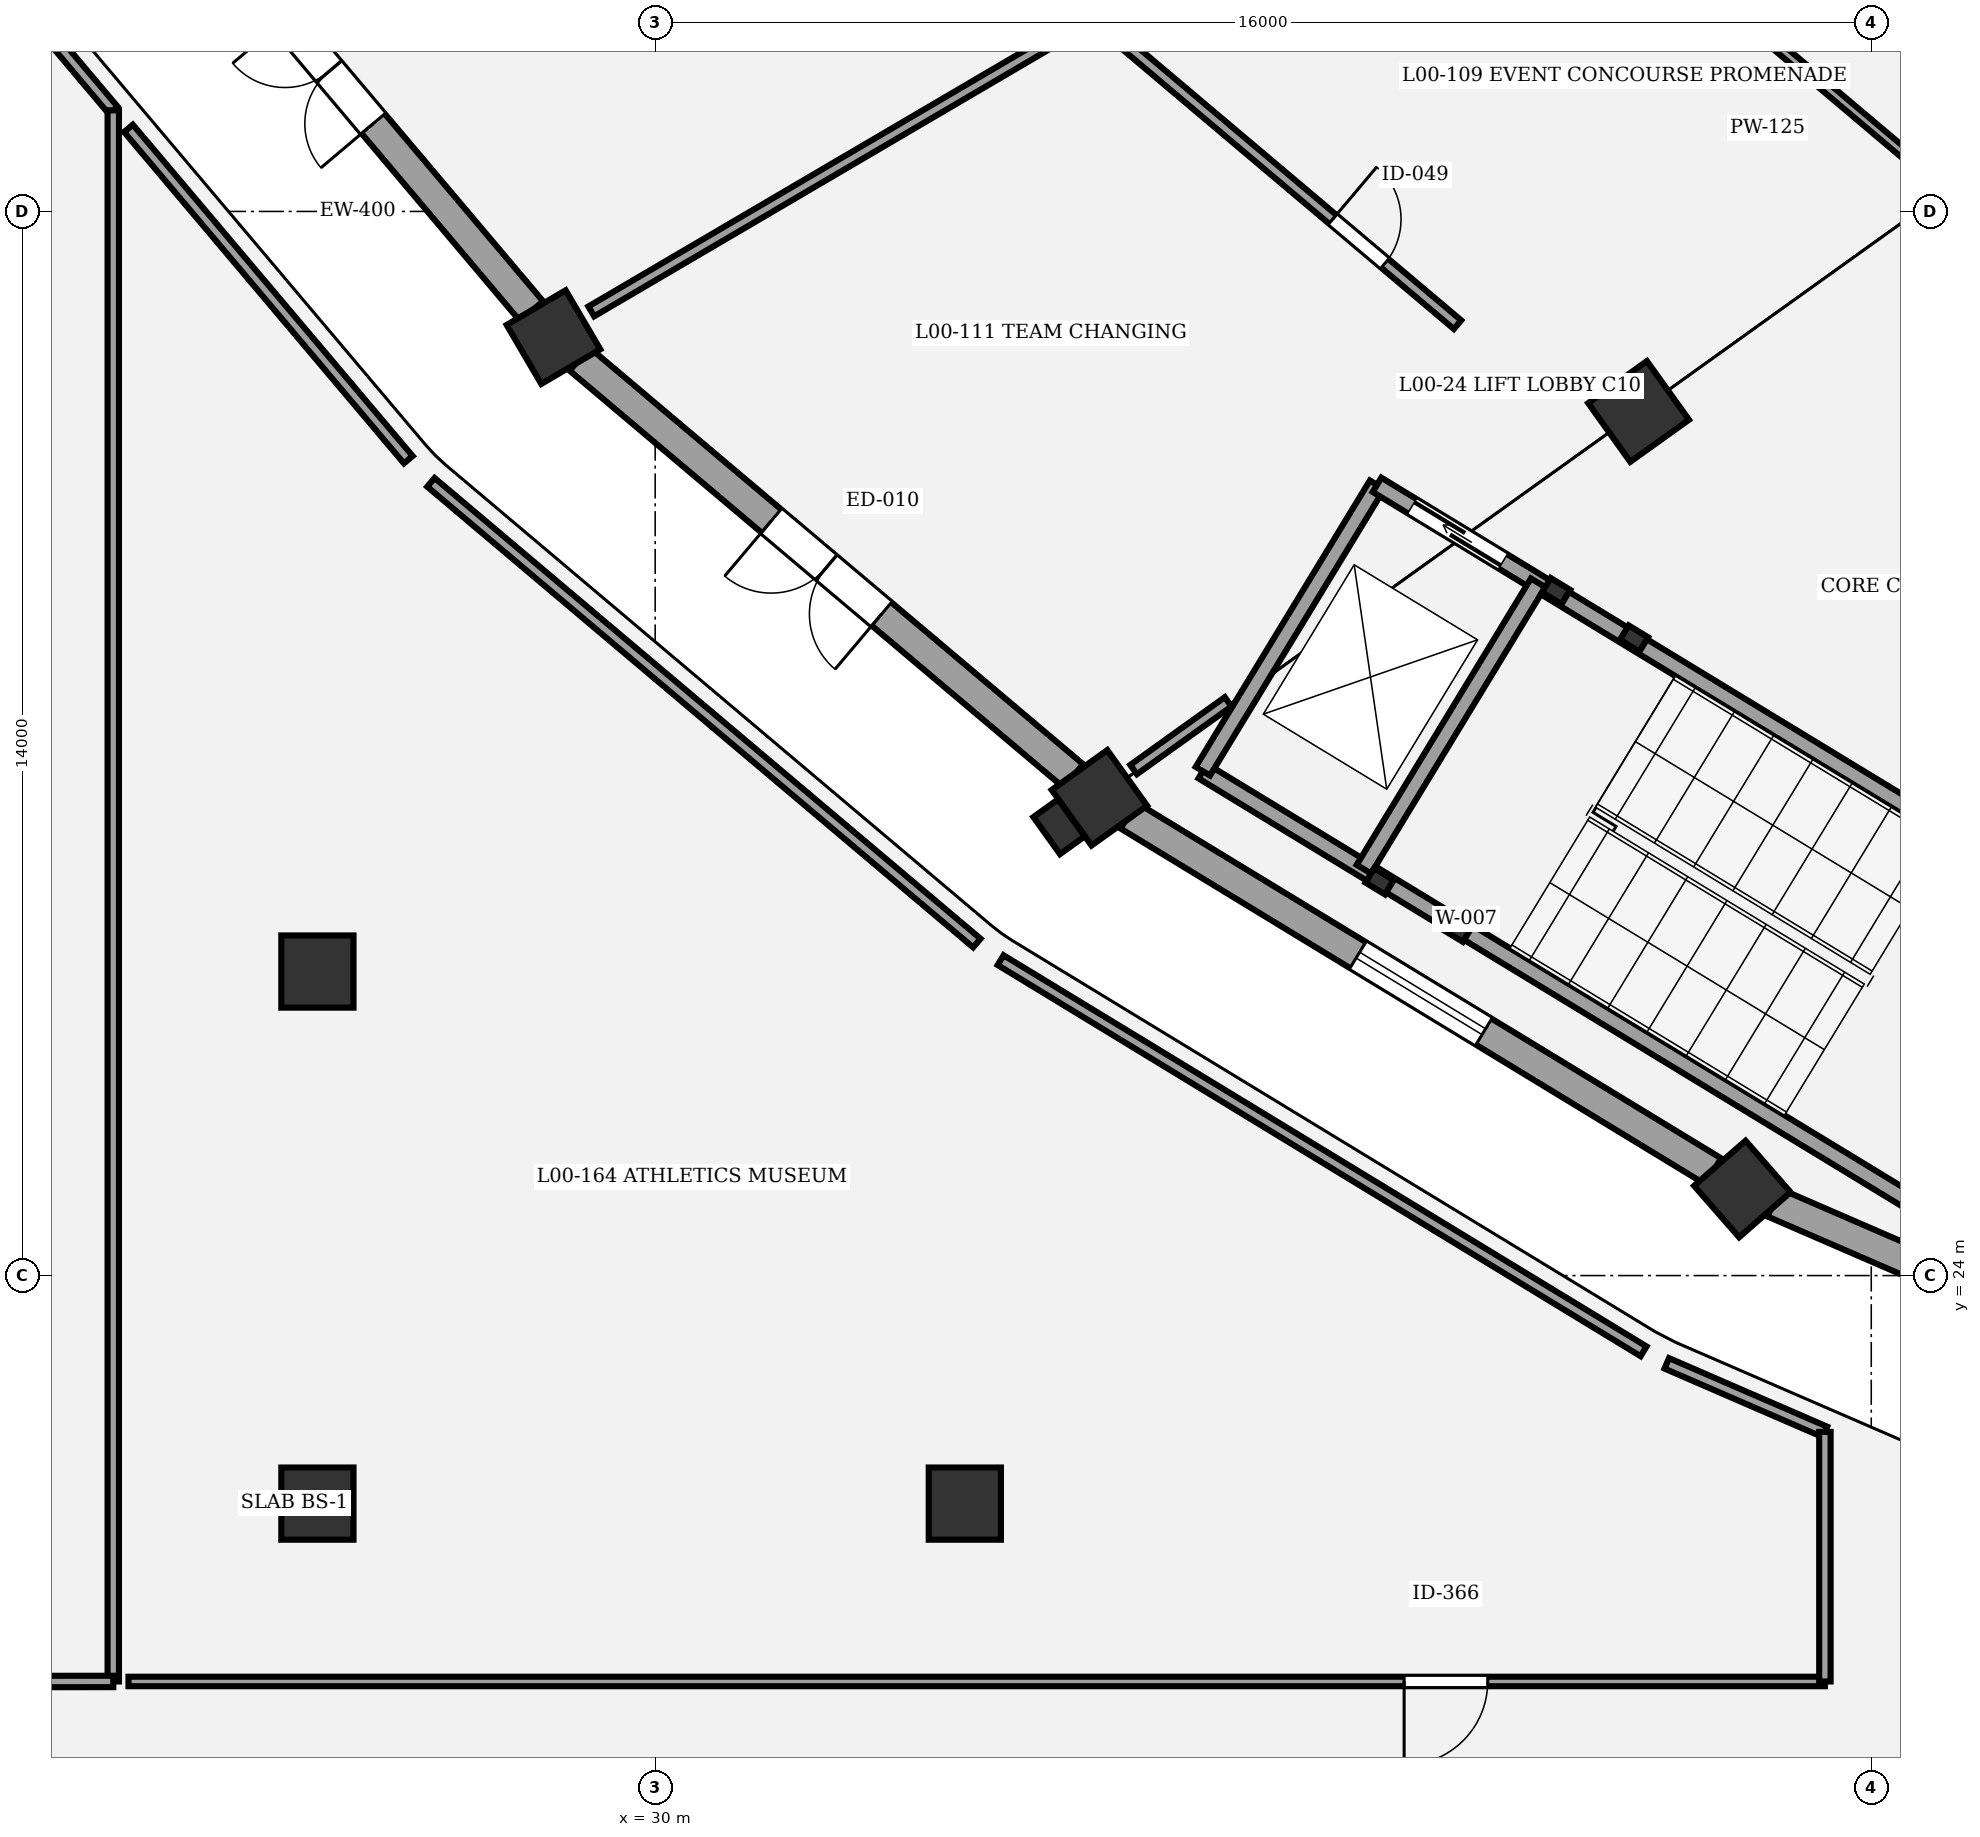
"""IFC4 building model, lengths in metres.
Left out: names, types, materials, properties, quantities, classifications, styles, units other than length and angle.
Written with IfcOpenShell. Run it as: python <this file> out.ifc"""

import sys

from ifc_helpers import new_model, si_unit, direction, frame, frame_2d, origin, origin_2d, place, context, subcontext, project, spatial, rectangle, circle, extrude, element, fill, save


model = new_model("IFC4")
c1 = context("Model", 3, precision=1e-05, world=origin(), true_north=direction((0.0, 1.0)))
c2 = subcontext(c1, "Body", "Model", "MODEL_VIEW")
j1 = project(units=[si_unit("LENGTHUNIT", "METRE"), si_unit("PLANEANGLEUNIT", "RADIAN")], contexts=[c1])
p1 = place(None, origin())
s1 = spatial("IfcSite", under=j1, at=p1, CompositionType="ELEMENT")
p2 = place(p1, origin())
s2 = spatial("IfcBuilding", under=s1, at=p2, CompositionType="ELEMENT")
p3 = place(p2, origin())
s3 = spatial("IfcBuildingStorey", under=s2, at=p3, CompositionType="ELEMENT", Elevation=0.0)
p4 = place(p3, frame((28.662, 36.346, 0.0), z_axis=(0.0, 0.0, 1.0), x_axis=(-0.862513669207, -0.506033764121, 0.0)))
e1 = element("IfcColumn", 1, at=p4, inside=s3, PredefinedType="COLUMN", context=c2, shape_type="SweptSolid", body=[
    extrude(rectangle(XDim=0.9, YDim=0.9, at=origin_2d()), origin(), (0.0, 0.0, 1.0), 5.4),
])
p5 = place(p3, frame((42.939, 35.368, 0.0), z_axis=(0.0, 0.0, 1.0), x_axis=(-0.812897512265, -0.582406760395, 0.0)))
e2 = element("IfcColumn", 2, at=p5, inside=s3, PredefinedType="COLUMN", context=c2, shape_type="SweptSolid", body=[
    extrude(rectangle(XDim=0.95, YDim=0.95, at=origin_2d()), origin(), (0.0, 0.0, 1.0), 5.4),
])
p6 = place(p3, frame((35.844, 30.285, 0.0), z_axis=(0.0, 0.0, 1.0), x_axis=(-0.812897512265, -0.582406760395, 0.0)))
e3 = element("IfcColumn", 3, at=p6, inside=s3, PredefinedType="COLUMN", context=c2, shape_type="SweptSolid", body=[
    extrude(rectangle(XDim=0.9, YDim=0.9, at=origin_2d()), origin(), (0.0, 0.0, 1.0), 5.4),
])
p7 = place(p3, frame((35.314, 29.905, 0.0), z_axis=(0.0, 0.0, 1.0), x_axis=(0.582406760395, -0.812897512265, 0.0)))
e4 = element("IfcColumn", 4, at=p7, inside=s3, PredefinedType="PILASTER", context=c2, shape_type="SweptSolid", body=[
    extrude(rectangle(XDim=0.6, YDim=0.4, at=origin_2d()), origin(), (0.0, 0.0, 1.0), 5.4),
])
p8 = place(p3, frame((44.304, 25.139, 0.0), z_axis=(0.0, 0.0, 1.0), x_axis=(-0.752529860433, -0.658558128912, 0.0)))
e5 = element("IfcColumn", 5, at=p8, inside=s3, PredefinedType="COLUMN", context=c2, shape_type="SweptSolid", body=[
    extrude(rectangle(XDim=0.9, YDim=0.9, at=origin_2d()), origin(), (0.0, 0.0, 1.0), 5.4),
])
for number, where, z_axis, x_axis in (
    (6, (25.556, 21.0, 0.0), (0.0, 0.0, 1.0), (1.0, 0.0, 0.0)),
    (7, (25.556, 28.0, 0.0), (0.0, 0.0, 1.0), (1.0, 0.0, 0.0)),
    (8, (34.074, 21.0, 0.0), (0.0, 0.0, 1.0), (1.0, 0.0, 0.0)),
):
    element("IfcColumn", number, at=place(p3, frame(where, z_axis=z_axis, x_axis=x_axis)), inside=s3, PredefinedType="COLUMN", context=c2, shape_type="SweptSolid", body=[
        extrude(circle(Radius=0.475, at=origin_2d()), origin(), (0.0, 0.0, 1.0), 5.4),
    ])
p9 = place(p3, frame((28.373, 36.689, 0.0), z_axis=(0.0, 0.0, 1.0), x_axis=(-0.645194244502, 0.764018577563, 0.0)))
e9 = element("IfcWall", 9, at=p9, inside=s3, PredefinedType="STANDARD", context=c2, shape_type="SweptSolid", body=[
    extrude(rectangle(XDim=8.256, YDim=0.4, at=frame_2d((4.128, 0.0))), origin(), (0.0, 0.0, 1.0), 4.25),
])
p10 = place(p9, frame((3.228, 0.0, 0.0)))
e10 = element("IfcOpeningElement", 10, at=p10, cuts=e9, PredefinedType="OPENING", context=c2, shape_type="SweptSolid", body=[
    extrude(rectangle(XDim=1.8, YDim=2.4, at=frame_2d((0.9, 1.2))), frame((0.0, 0.21, 0.0), z_axis=(0.0, -1.0, 0.0), x_axis=(1.0, 0.0, 0.0)), (0.0, 0.0, 1.0), 0.42),
])
p11 = place(p3, frame((35.502, 30.574, 0.0), z_axis=(0.0, 0.0, 1.0), x_axis=(-0.764254773348, 0.644914445035, 0.0)))
e11 = element("IfcWall", 11, at=p11, inside=s3, PredefinedType="STANDARD", context=c2, shape_type="SweptSolid", body=[
    extrude(rectangle(XDim=8.502, YDim=0.4, at=frame_2d((4.251, 0.0))), origin(), (0.0, 0.0, 1.0), 4.25),
])
p12 = place(p11, frame((3.301, 0.0, 0.0)))
e12 = element("IfcOpeningElement", 12, at=p12, cuts=e11, PredefinedType="OPENING", context=c2, shape_type="SweptSolid", body=[
    extrude(rectangle(XDim=1.9, YDim=2.4, at=frame_2d((0.95, 1.2))), frame((0.0, 0.21, 0.0), z_axis=(0.0, -1.0, 0.0), x_axis=(1.0, 0.0, 0.0)), (0.0, 0.0, 1.0), 0.42),
])
p13 = place(p3, frame((43.921, 25.372, 0.0), z_axis=(0.0, 0.0, 1.0), x_axis=(-0.854319454423, 0.519748275413, 0.0)))
e13 = element("IfcWall", 13, at=p13, inside=s3, PredefinedType="STANDARD", context=c2, shape_type="SweptSolid", body=[
    extrude(rectangle(XDim=9.006, YDim=0.4, at=frame_2d((4.503, 0.0))), origin(), (0.0, 0.0, 1.0), 4.25),
])
p14 = place(p13, frame((3.533, 0.0, 1.1)))
e14 = element("IfcOpeningElement", 14, at=p14, cuts=e13, PredefinedType="OPENING", context=c2, shape_type="SweptSolid", body=[
    extrude(rectangle(XDim=1.94, YDim=1.55, at=frame_2d((0.97, 0.775))), frame((0.0, 0.21, 0.0), z_axis=(0.0, -1.0, 0.0), x_axis=(1.0, 0.0, 0.0)), (0.0, 0.0, 1.0), 0.42),
])
p15 = place(p3, frame((53.651, 21.087, 0.0), z_axis=(0.0, 0.0, 1.0), x_axis=(-0.917498309763, 0.397739678159, 0.0)))
e15 = element("IfcWall", 15, at=p15, inside=s3, PredefinedType="STANDARD", context=c2, shape_type="SweptSolid", body=[
    extrude(rectangle(XDim=9.74, YDim=0.4, at=frame_2d((4.87, 0.0))), origin(), (0.0, 0.0, 1.0), 4.25),
])
p16 = place(p15, frame((3.87, 0.0, 0.0)))
e16 = element("IfcOpeningElement", 16, at=p16, cuts=e15, PredefinedType="OPENING", context=c2, shape_type="SweptSolid", body=[
    extrude(rectangle(XDim=2.0, YDim=2.4, at=frame_2d((1.0, 1.2))), frame((0.0, 0.21, 0.0), z_axis=(0.0, -1.0, 0.0), x_axis=(1.0, 0.0, 0.0)), (0.0, 0.0, 1.0), 0.42),
])
for number, where, z_axis, x_axis in (
    (17, (42.879, 32.382, 0.0), (0.0, 0.0, 1.0), (-0.854, 0.52, 0.0)),
    (18, (41.854, 33.005, 0.0), (0.0, 0.0, 1.0), (-0.854, 0.52, 0.0)),
    (19, (39.531, 29.186, 0.0), (0.0, 0.0, 1.0), (-0.854, 0.52, 0.0)),
    (20, (40.556, 28.562, 0.0), (0.0, 0.0, 1.0), (-0.854, 0.52, 0.0)),
):
    element("IfcColumn", number, at=place(p3, frame(where, z_axis=z_axis, x_axis=x_axis)), inside=s3, PredefinedType="COLUMN", context=c2, shape_type="SweptSolid", body=[
        extrude(rectangle(XDim=0.3, YDim=0.22, at=origin_2d()), origin(), (0.0, 0.0, 1.0), 5.4),
    ])
p17 = place(p3, frame((46.621, 24.909, 0.0), z_axis=(0.0, 0.0, 1.0), x_axis=(-0.854373055797, 0.519660159651, 0.0)))
e21 = element("IfcWall", 21, at=p17, inside=s3, PredefinedType="SHEAR", context=c2, shape_type="SweptSolid", body=[
    extrude(rectangle(XDim=11.02, YDim=0.22, at=frame_2d((5.51, 0.0))), origin(), (0.0, 0.0, 1.0), 5.15),
])
p18 = place(p3, frame((39.497, 34.403, 0.0), z_axis=(0.0, 0.0, 1.0), x_axis=(-0.519664162523, -0.854370621095, 0.0)))
e22 = element("IfcWall", 22, at=p18, inside=s3, PredefinedType="SHEAR", context=c2, shape_type="SweptSolid", body=[
    extrude(rectangle(XDim=4.41, YDim=0.22, at=frame_2d((2.205, 0.0))), origin(), (0.0, 0.0, 1.0), 5.15),
])
p19 = place(p3, frame((48.913, 28.677, 0.0), z_axis=(0.0, 0.0, 1.0), x_axis=(-0.854369202373, 0.51966649501, 0.0)))
e23 = element("IfcWall", 23, at=p19, inside=s3, PredefinedType="SHEAR", context=c2, shape_type="SweptSolid", body=[
    extrude(rectangle(XDim=11.02, YDim=0.22, at=frame_2d((5.51, 0.0))), origin(), (0.0, 0.0, 1.0), 5.15),
])
p20 = place(p19, frame((0.3, 0.0, 0.0)))
e24 = element("IfcOpeningElement", 24, at=p20, cuts=e23, PredefinedType="OPENING", context=c2, shape_type="SweptSolid", body=[
    extrude(rectangle(XDim=1.15, YDim=2.15, at=frame_2d((0.575, 1.075))), frame((0.0, 0.12, 0.0), z_axis=(0.0, -1.0, 0.0), x_axis=(1.0, 0.0, 0.0)), (0.0, 0.0, 1.0), 0.24),
])
p21 = place(p19, frame((9.08, 0.0, 0.0)))
e25 = element("IfcOpeningElement", 25, at=p21, cuts=e23, PredefinedType="OPENING", context=c2, shape_type="SweptSolid", body=[
    extrude(rectangle(XDim=1.4, YDim=2.25, at=frame_2d((0.7, 1.125))), frame((0.0, 0.12, 0.0), z_axis=(0.0, -1.0, 0.0), x_axis=(1.0, 0.0, 0.0)), (0.0, 0.0, 1.0), 0.24),
])
p22 = place(p3, frame((41.616, 33.115, 0.0), z_axis=(0.0, 0.0, 1.0), x_axis=(-0.519664162523, -0.854370621095, 0.0)))
e26 = element("IfcWall", 26, at=p22, inside=s3, PredefinedType="SHEAR", context=c2, shape_type="SweptSolid", body=[
    extrude(rectangle(XDim=4.41, YDim=0.22, at=frame_2d((2.205, 0.0))), origin(), (0.0, 0.0, 1.0), 5.15),
])
p23 = place(p3, frame((46.973, 38.308, 0.0), z_axis=(0.0, 0.0, 1.0), x_axis=(-0.764249122867, 0.644921141068, 0.0)))
e27 = element("IfcWall", 27, at=p23, inside=s3, PredefinedType="PARTITIONING", context=c2, shape_type="SweptSolid", body=[
    extrude(rectangle(XDim=7.99, YDim=0.125, at=frame_2d((3.995, 0.0))), origin(), (0.0, 0.0, 1.0), 4.15),
])
p24 = place(p23, frame((5.08, 0.0, 0.0)))
e28 = element("IfcOpeningElement", 28, at=p24, cuts=e27, PredefinedType="OPENING", context=c2, shape_type="SweptSolid", body=[
    extrude(rectangle(XDim=1.4, YDim=2.1, at=frame_2d((0.7, 1.05))), frame((0.0, 0.073, 0.0), z_axis=(0.0, -1.0, 0.0), x_axis=(1.0, 0.0, 0.0)), (0.0, 0.0, 1.0), 0.145),
])
p25 = place(p3, frame((35.825, 40.503, 0.0), z_axis=(0.0, 0.0, 1.0), x_axis=(0.764269616674, -0.644896854565, 0.0)))
e29 = element("IfcWall", 29, at=p25, inside=s3, PredefinedType="PARTITIONING", context=c2, shape_type="SweptSolid", body=[
    extrude(rectangle(XDim=6.191, YDim=0.15, at=frame_2d((3.095, 0.0))), origin(), (0.0, 0.0, 1.0), 4.15),
])
p26 = place(p25, frame((4.041, 0.0, 0.0)))
e30 = element("IfcOpeningElement", 30, at=p26, cuts=e29, PredefinedType="OPENING", context=c2, shape_type="SweptSolid", body=[
    extrude(rectangle(XDim=0.9, YDim=2.2, at=frame_2d((0.45, 1.1))), frame((0.0, 0.085, 0.0), z_axis=(0.0, -1.0, 0.0), x_axis=(1.0, 0.0, 0.0)), (0.0, 0.0, 1.0), 0.17),
])
p27 = place(p3, frame((45.39, 18.66, 0.0), z_axis=(0.0, 0.0, 1.0), x_axis=(-1.0, 0.0, 0.0)))
e31 = element("IfcWall", 31, at=p27, inside=s3, PredefinedType="PARTITIONING", context=c2, shape_type="SweptSolid", body=[
    extrude(rectangle(XDim=22.32, YDim=0.125, at=frame_2d((11.16, 0.0))), origin(), (0.0, 0.0, 1.0), 4.15),
])
p28 = place(p27, frame((4.436, 0.0, 0.0)))
e32 = element("IfcOpeningElement", 32, at=p28, cuts=e31, PredefinedType="OPENING", context=c2, shape_type="SweptSolid", body=[
    extrude(rectangle(XDim=1.1, YDim=2.1, at=frame_2d((0.55, 1.05))), frame((0.0, 0.073, 0.0), z_axis=(0.0, -1.0, 0.0), x_axis=(1.0, 0.0, 0.0)), (0.0, 0.0, 1.0), 0.145),
])
p29 = place(p3, frame((35.768, 40.562, 0.0), z_axis=(0.0, 0.0, 1.0), x_axis=(-0.862520085009, -0.506022828492, 0.0)))
e33 = element("IfcWall", 33, at=p29, inside=s3, PredefinedType="PARTITIONING", context=c2, shape_type="SweptSolid", body=[
    extrude(rectangle(XDim=7.663, YDim=0.15, at=frame_2d((3.831, 0.0))), origin(), (0.0, 0.0, 1.0), 4.15),
])
p30 = place(p3, frame((37.538, 31.548, 0.0), z_axis=(0.0, 0.0, 1.0), x_axis=(-0.812848600764, -0.582475022844, 0.0)))
e34 = element("IfcWall", 34, at=p30, inside=s3, PredefinedType="PARTITIONING", context=c2, shape_type="SweptSolid", body=[
    extrude(rectangle(XDim=1.53, YDim=0.15, at=frame_2d((0.765, 0.0))), origin(), (0.0, 0.0, 1.0), 4.15),
])
p31 = place(p3, frame((20.847, 41.726, 0.0), z_axis=(0.0, 0.0, 1.0), x_axis=(0.64518788911, -0.764023944485, 0.0)))
e35 = element("IfcWall", 35, at=p31, inside=s3, PredefinedType="PARTITIONING", context=c2, shape_type="SweptSolid", body=[
    extrude(rectangle(XDim=3.135, YDim=0.15, at=frame_2d((1.567, 0.0))), origin(), (0.0, 0.0, 1.0), 4.15),
])
p32 = place(p3, frame((22.87, 39.33, 0.0), z_axis=(0.0, 0.0, 1.0), x_axis=(0.0, -1.0, 0.0)))
e36 = element("IfcWall", 36, at=p32, inside=s3, PredefinedType="PARTITIONING", context=c2, shape_type="SweptSolid", body=[
    extrude(rectangle(XDim=20.67, YDim=0.15, at=frame_2d((10.335, 0.0))), origin(), (0.0, 0.0, 1.0), 4.15),
])
p33 = place(p3, frame((22.87, 18.66, 0.0), z_axis=(0.0, 0.0, 1.0), x_axis=(-0.999999951445, -0.000311623544, 0.0)))
e37 = element("IfcWall", 37, at=p33, inside=s3, PredefinedType="PARTITIONING", context=c2, shape_type="SweptSolid", body=[
    extrude(rectangle(XDim=9.401, YDim=0.15, at=frame_2d((4.701, 0.0))), origin(), (0.0, 0.0, 1.0), 4.15),
])
p34 = place(p3, frame((27.049, 34.436, 0.0), z_axis=(0.0, 0.0, 1.0), x_axis=(0.76426547638, -0.644901761212, 0.0)))
e38 = element("IfcWall", 38, at=p34, inside=s3, PredefinedType="PARTITIONING", context=c2, shape_type="SweptSolid", body=[
    extrude(rectangle(XDim=9.398, YDim=0.15, at=frame_2d((4.699, 0.0))), origin(), (0.0, 0.0, 1.0), 4.15),
])
p35 = place(p3, frame((34.545, 28.15, 0.0), z_axis=(0.0, 0.0, 1.0), x_axis=(0.854333268174, -0.519725568826, 0.0)))
e39 = element("IfcWall", 39, at=p35, inside=s3, PredefinedType="PARTITIONING", context=c2, shape_type="SweptSolid", body=[
    extrude(rectangle(XDim=9.902, YDim=0.15, at=frame_2d((4.951, 0.0))), origin(), (0.0, 0.0, 1.0), 4.15),
])
p36 = place(p3, frame((43.31, 22.845, 0.0), z_axis=(0.0, 0.0, 1.0), x_axis=(0.917454774934, -0.397840088415, 0.0)))
e40 = element("IfcWall", 40, at=p36, inside=s3, PredefinedType="PARTITIONING", context=c2, shape_type="SweptSolid", body=[
    extrude(rectangle(XDim=2.268, YDim=0.15, at=frame_2d((1.134, 0.0))), origin(), (0.0, 0.0, 1.0), 4.15),
])
p37 = place(p3, frame((45.39, 21.943, 0.0), z_axis=(0.0, 0.0, 1.0), x_axis=(0.0, -1.0, 0.0)))
e41 = element("IfcWall", 41, at=p37, inside=s3, PredefinedType="PARTITIONING", context=c2, shape_type="SweptSolid", body=[
    extrude(rectangle(XDim=3.283, YDim=0.15, at=frame_2d((1.642, 0.0))), origin(), (0.0, 0.0, 1.0), 4.15),
])
p38 = place(p3, frame((23.07, 39.094, 0.0), z_axis=(0.0, 0.0, 1.0), x_axis=(0.645178597855, -0.764031790484, 0.0)))
e42 = element("IfcWall", 42, at=p38, inside=s3, PredefinedType="PARTITIONING", context=c2, shape_type="SweptSolid", body=[
    extrude(rectangle(XDim=5.706, YDim=0.15, at=frame_2d((2.853, 0.0))), origin(), (0.0, 0.0, 1.0), 4.15),
])
p39 = place(p10, origin())
e43 = element("IfcDoor", 43, at=p39, inside=s3, OperationType="DOUBLE_DOOR_SINGLE_SWING", PredefinedType="DOOR", context=c2, shape_type="SweptSolid", body=[
    extrude(rectangle(XDim=1.8, YDim=2.4, at=frame_2d((0.9, 1.2))), frame((0.0, 0.025, 0.0), z_axis=(0.0, -1.0, 0.0), x_axis=(1.0, 0.0, 0.0)), (0.0, 0.0, 1.0), 0.05),
])
fill(e10, e43)
p40 = place(p12, origin())
e44 = element("IfcDoor", 44, at=p40, inside=s3, OperationType="DOUBLE_DOOR_SINGLE_SWING", PredefinedType="DOOR", context=c2, shape_type="SweptSolid", body=[
    extrude(rectangle(XDim=1.9, YDim=2.4, at=frame_2d((0.95, 1.2))), frame((0.0, 0.025, 0.0), z_axis=(0.0, -1.0, 0.0), x_axis=(1.0, 0.0, 0.0)), (0.0, 0.0, 1.0), 0.05),
])
fill(e12, e44)
p41 = place(p14, origin())
e45 = element("IfcWindow", 45, at=p41, inside=s3, PartitioningType="SINGLE_PANEL", PredefinedType="WINDOW", context=c2, shape_type="SweptSolid", body=[
    extrude(rectangle(XDim=1.94, YDim=1.55, at=frame_2d((0.97, 0.775))), frame((0.0, 0.03, 0.0), z_axis=(0.0, -1.0, 0.0), x_axis=(1.0, 0.0, 0.0)), (0.0, 0.0, 1.0), 0.06),
])
fill(e14, e45)
p42 = place(p21, origin())
e46 = element("IfcDoor", 46, at=p42, inside=s3, OperationType="DOUBLE_DOOR_SLIDING", PredefinedType="DOOR", context=c2, shape_type="SweptSolid", body=[
    extrude(rectangle(XDim=1.4, YDim=2.25, at=frame_2d((0.7, 1.125))), frame((0.0, 0.025, 0.0), z_axis=(0.0, -1.0, 0.0), x_axis=(1.0, 0.0, 0.0)), (0.0, 0.0, 1.0), 0.05),
])
fill(e25, e46)
p43 = place(p26, origin())
e47 = element("IfcDoor", 47, at=p43, inside=s3, OperationType="SINGLE_SWING_LEFT", PredefinedType="DOOR", context=c2, shape_type="SweptSolid", body=[
    extrude(rectangle(XDim=0.9, YDim=2.2, at=frame_2d((0.45, 1.1))), frame((0.0, 0.025, 0.0), z_axis=(0.0, -1.0, 0.0), x_axis=(1.0, 0.0, 0.0)), (0.0, 0.0, 1.0), 0.05),
])
fill(e30, e47)
p44 = place(p28, origin())
e48 = element("IfcDoor", 48, at=p44, inside=s3, OperationType="SINGLE_SWING_RIGHT", PredefinedType="DOOR", context=c2, shape_type="SweptSolid", body=[
    extrude(rectangle(XDim=1.1, YDim=2.1, at=frame_2d((0.55, 1.05))), frame((0.0, 0.025, 0.0), z_axis=(0.0, -1.0, 0.0), x_axis=(1.0, 0.0, 0.0)), (0.0, 0.0, 1.0), 0.05),
])
fill(e32, e48)
save(model, sys.argv[1])
